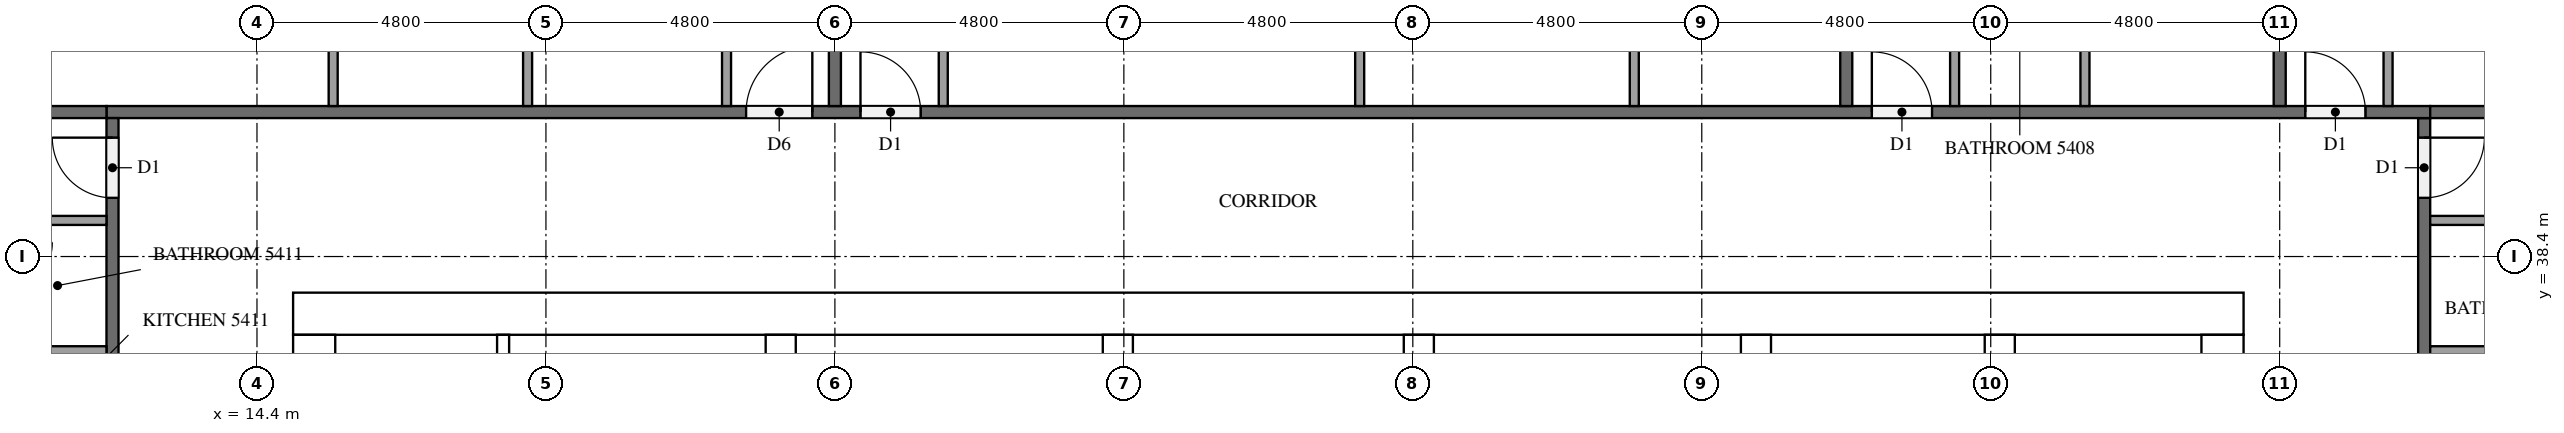
"""IFC4 building model, lengths in metres.
Left out: names, types, materials, properties, quantities, classifications, styles, units other than length and angle.
Written with IfcOpenShell. Run it as: python <this file> out.ifc"""

import sys

from ifc_helpers import new_model, si_unit, direction, frame, frame_2d, origin, place, context, subcontext, project, spatial, rectangle, extrude, element, fill, save


model = new_model("IFC4")
c1 = context("Model", 3, precision=1e-05, world=origin(), true_north=direction((0.0, 1.0)))
c2 = subcontext(c1, "Body", "Model", "MODEL_VIEW")
j1 = project(units=[si_unit("LENGTHUNIT", "METRE"), si_unit("PLANEANGLEUNIT", "RADIAN")], contexts=[c1])
p1 = place(None, origin())
s1 = spatial("IfcSite", under=j1, at=p1, CompositionType="ELEMENT")
p2 = place(p1, origin())
s2 = spatial("IfcBuilding", under=s1, at=p2, CompositionType="ELEMENT")
p3 = place(p2, frame((0.0, 0.0, 208.8)))
s3 = spatial("IfcBuildingStorey", under=s2, at=p3, CompositionType="ELEMENT", Elevation=208.8)
p4 = place(p3, frame((15.0, 37.45, 0.0), z_axis=(0.0, 0.0, 1.0), x_axis=(1.0, 0.0, 0.0)))
e1 = element("IfcWall", 1, at=p4, inside=s3, PredefinedType="SHEAR", context=c2, shape_type="SweptSolid", body=[
    extrude(rectangle(XDim=32.4, YDim=0.7, at=frame_2d((16.2, 0.0))), origin(), (0.0, 0.0, 1.0), 3.2),
])
p5 = place(p4, frame((15.3, 0.0, 0.0)))
e2 = element("IfcOpeningElement", 2, at=p5, cuts=e1, PredefinedType="OPENING", context=c2, shape_type="SweptSolid", body=[
    extrude(rectangle(XDim=1.8, YDim=2.1, at=frame_2d((0.9, 1.05))), frame((0.0, 0.36, 0.0), z_axis=(0.0, -1.0, 0.0), x_axis=(1.0, 0.0, 0.0)), (0.0, 0.0, 1.0), 0.72),
])
p6 = place(p4, frame((1.544, 0.0, 0.0)))
e3 = element("IfcOpeningElement", 3, at=p6, cuts=e1, PredefinedType="OPENING", context=c2, shape_type="SweptSolid", body=[
    extrude(rectangle(XDim=1.0, YDim=2.1, at=frame_2d((0.5, 1.05))), frame((0.0, 0.36, 0.0), z_axis=(0.0, -1.0, 0.0), x_axis=(1.0, 0.0, 0.0)), (0.0, 0.0, 1.0), 0.72),
])
p7 = place(p4, frame((5.219, 0.0, 0.0)))
e4 = element("IfcOpeningElement", 4, at=p7, cuts=e1, PredefinedType="OPENING", context=c2, shape_type="SweptSolid", body=[
    extrude(rectangle(XDim=1.0, YDim=2.1, at=frame_2d((0.5, 1.05))), frame((0.0, 0.36, 0.0), z_axis=(0.0, -1.0, 0.0), x_axis=(1.0, 0.0, 0.0)), (0.0, 0.0, 1.0), 0.72),
])
p8 = place(p3, frame((15.35, 15.7, 0.0), z_axis=(0.0, 0.0, 1.0), x_axis=(0.0, 1.0, 0.0)))
e5 = element("IfcWall", 5, at=p8, inside=s3, PredefinedType="SHEAR", context=c2, shape_type="SweptSolid", body=[
    extrude(rectangle(XDim=21.4, YDim=0.7, at=frame_2d((10.7, 0.0))), origin(), (0.0, 0.0, 1.0), 3.2),
])
p9 = place(p8, frame((5.06, 0.0, 0.0)))
e6 = element("IfcOpeningElement", 6, at=p9, cuts=e5, PredefinedType="OPENING", context=c2, shape_type="SweptSolid", body=[
    extrude(rectangle(XDim=1.2, YDim=2.1, at=frame_2d((0.6, 1.05))), frame((0.0, 0.36, 0.0), z_axis=(0.0, -1.0, 0.0), x_axis=(1.0, 0.0, 0.0)), (0.0, 0.0, 1.0), 0.72),
])
p10 = place(p3, frame((47.05, 15.7, 0.0), z_axis=(0.0, 0.0, 1.0), x_axis=(0.0, 1.0, 0.0)))
e7 = element("IfcWall", 7, at=p10, inside=s3, PredefinedType="SHEAR", context=c2, shape_type="SweptSolid", body=[
    extrude(rectangle(XDim=21.4, YDim=0.7, at=frame_2d((10.7, 0.0))), origin(), (0.0, 0.0, 1.0), 3.2),
])
p11 = place(p10, frame((10.4, 0.0, 0.0)))
e8 = element("IfcOpeningElement", 8, at=p11, cuts=e7, PredefinedType="OPENING", context=c2, shape_type="SweptSolid", body=[
    extrude(rectangle(XDim=1.2, YDim=2.1, at=frame_2d((0.6, 1.05))), frame((0.0, 0.36, 0.0), z_axis=(0.0, -1.0, 0.0), x_axis=(1.0, 0.0, 0.0)), (0.0, 0.0, 1.0), 0.72),
])
p12 = place(p3, frame((23.1, 15.7, 0.0), z_axis=(0.0, 0.0, 1.0), x_axis=(0.0, 1.0, 0.0)))
e9 = element("IfcWall", 9, at=p12, inside=s3, PredefinedType="SHEAR", context=c2, shape_type="SweptSolid", body=[
    extrude(rectangle(XDim=21.4, YDim=0.5, at=frame_2d((10.7, 0.0))), origin(), (0.0, 0.0, 1.0), 3.2),
])
p13 = place(p3, frame((39.3, 27.75, 0.0), z_axis=(0.0, 0.0, 1.0), x_axis=(0.0, 1.0, 0.0)))
e10 = element("IfcWall", 10, at=p13, inside=s3, PredefinedType="SHEAR", context=c2, shape_type="SweptSolid", body=[
    extrude(rectangle(XDim=9.35, YDim=0.5, at=frame_2d((4.675, 0.0))), origin(), (0.0, 0.0, 1.0), 3.2),
])
p14 = place(p3, frame((43.35, 27.75, 0.0), z_axis=(0.0, 0.0, 1.0), x_axis=(0.0, 1.0, 0.0)))
e11 = element("IfcWall", 11, at=p14, inside=s3, PredefinedType="SHEAR", context=c2, shape_type="SweptSolid", body=[
    extrude(rectangle(XDim=9.35, YDim=0.5, at=frame_2d((4.675, 0.0))), origin(), (0.0, 0.0, 1.0), 3.2),
])
p15 = place(p14, frame((7.65, 0.0, 0.0)))
e12 = element("IfcOpeningElement", 12, at=p15, cuts=e11, PredefinedType="OPENING", context=c2, shape_type="SweptSolid", body=[
    extrude(rectangle(XDim=1.2, YDim=2.1, at=frame_2d((0.6, 1.05))), frame((0.0, 0.26, 0.0), z_axis=(0.0, -1.0, 0.0), x_axis=(1.0, 0.0, 0.0)), (0.0, 0.0, 1.0), 0.52),
])
for number, where, z_axis, x_axis in (
    (13, (28.7, 33.8, 0.0), (0.0, 0.0, 1.0), (0.0, 1.0, 0.0)),
    (14, (33.7, 33.8, 0.0), (0.0, 0.0, 1.0), (0.0, 1.0, 0.0)),
):
    element("IfcWall", number, at=place(p3, frame(where, z_axis=z_axis, x_axis=x_axis)), inside=s3, PredefinedType="SHEAR", context=c2, shape_type="SweptSolid", body=[
        extrude(rectangle(XDim=3.3, YDim=0.5, at=frame_2d((1.65, 0.0))), origin(), (0.0, 0.0, 1.0), 3.2),
    ])
p16 = place(p3, frame((18.489, 31.5, 0.0), z_axis=(0.0, 0.0, 1.0), x_axis=(0.0, 1.0, 0.0)))
e15 = element("IfcWall", 15, at=p16, inside=s3, PredefinedType="PARTITIONING", context=c2, shape_type="SweptSolid", body=[
    extrude(rectangle(XDim=5.6, YDim=0.2, at=frame_2d((2.8, 0.0))), origin(), (0.0, 0.0, 1.0), 3.2),
])
p17 = place(p3, frame((50.4, 40.7, 0.0), z_axis=(0.0, 0.0, 1.0), x_axis=(0.0, -1.0, 0.0)))
e16 = element("IfcWall", 16, at=p17, inside=s3, PredefinedType="PARTITIONING", context=c2, shape_type="SweptSolid", body=[
    extrude(rectangle(XDim=28.6, YDim=0.2, at=frame_2d((14.3, 0.0))), origin(), (0.0, 0.0, 1.0), 3.2),
])
p18 = place(p17, frame((19.525, 0.0, 0.0)))
e17 = element("IfcOpeningElement", 17, at=p18, cuts=e16, PredefinedType="OPENING", context=c2, shape_type="SweptSolid", body=[
    extrude(rectangle(XDim=1.0, YDim=2.1, at=frame_2d((0.5, 1.05))), frame((0.0, 0.11, 0.0), z_axis=(0.0, -1.0, 0.0), x_axis=(1.0, 0.0, 0.0)), (0.0, 0.0, 1.0), 0.22),
])
p19 = place(p17, frame((7.525, 0.0, 0.0)))
e18 = element("IfcOpeningElement", 18, at=p19, cuts=e16, PredefinedType="OPENING", context=c2, shape_type="SweptSolid", body=[
    extrude(rectangle(XDim=1.0, YDim=2.1, at=frame_2d((0.5, 1.05))), frame((0.0, 0.11, 0.0), z_axis=(0.0, -1.0, 0.0), x_axis=(1.0, 0.0, 0.0)), (0.0, 0.0, 1.0), 0.22),
])
p20 = place(p17, frame((0.325, 0.0, 0.0)))
e19 = element("IfcOpeningElement", 19, at=p20, cuts=e16, PredefinedType="OPENING", context=c2, shape_type="SweptSolid", body=[
    extrude(rectangle(XDim=1.0, YDim=2.1, at=frame_2d((0.5, 1.05))), frame((0.0, 0.11, 0.0), z_axis=(0.0, -1.0, 0.0), x_axis=(1.0, 0.0, 0.0)), (0.0, 0.0, 1.0), 0.22),
])
p21 = place(p3, frame((11.9, 40.8, 0.0), z_axis=(0.0, 0.0, 1.0), x_axis=(1.0, 0.0, 0.0)))
e20 = element("IfcWall", 20, at=p21, inside=s3, PredefinedType="PARTITIONING", context=c2, shape_type="SweptSolid", body=[
    extrude(rectangle(XDim=38.6, YDim=0.2, at=frame_2d((19.3, 0.0))), origin(), (0.0, 0.0, 1.0), 3.2),
])
p22 = place(p21, frame((36.525, 0.0, 0.0)))
e21 = element("IfcOpeningElement", 21, at=p22, cuts=e20, PredefinedType="OPENING", context=c2, shape_type="SweptSolid", body=[
    extrude(rectangle(XDim=1.0, YDim=2.1, at=frame_2d((0.5, 1.05))), frame((0.0, 0.11, 0.0), z_axis=(0.0, -1.0, 0.0), x_axis=(1.0, 0.0, 0.0)), (0.0, 0.0, 1.0), 0.22),
])
p23 = place(p21, frame((29.325, 0.0, 0.0)))
e22 = element("IfcOpeningElement", 22, at=p23, cuts=e20, PredefinedType="OPENING", context=c2, shape_type="SweptSolid", body=[
    extrude(rectangle(XDim=1.0, YDim=2.1, at=frame_2d((0.5, 1.05))), frame((0.0, 0.11, 0.0), z_axis=(0.0, -1.0, 0.0), x_axis=(1.0, 0.0, 0.0)), (0.0, 0.0, 1.0), 0.22),
])
p24 = place(p21, frame((12.525, 0.0, 0.0)))
e23 = element("IfcOpeningElement", 23, at=p24, cuts=e20, PredefinedType="OPENING", context=c2, shape_type="SweptSolid", body=[
    extrude(rectangle(XDim=1.0, YDim=2.1, at=frame_2d((0.5, 1.05))), frame((0.0, 0.11, 0.0), z_axis=(0.0, -1.0, 0.0), x_axis=(1.0, 0.0, 0.0)), (0.0, 0.0, 1.0), 0.22),
])
p25 = place(p21, frame((10.625, 0.0, 0.0)))
e24 = element("IfcOpeningElement", 24, at=p25, cuts=e20, PredefinedType="OPENING", context=c2, shape_type="SweptSolid", body=[
    extrude(rectangle(XDim=1.1, YDim=2.1, at=frame_2d((0.55, 1.05))), frame((0.0, 0.11, 0.0), z_axis=(0.0, -1.0, 0.0), x_axis=(1.0, 0.0, 0.0)), (0.0, 0.0, 1.0), 0.22),
])
p26 = place(p3, frame((12.0, 12.1, 0.0), z_axis=(0.0, 0.0, 1.0), x_axis=(0.0, 1.0, 0.0)))
e25 = element("IfcWall", 25, at=p26, inside=s3, PredefinedType="PARTITIONING", context=c2, shape_type="SweptSolid", body=[
    extrude(rectangle(XDim=28.6, YDim=0.2, at=frame_2d((14.3, 0.0))), origin(), (0.0, 0.0, 1.0), 3.2),
])
p27 = place(p26, frame((27.275, 0.0, 0.0)))
e26 = element("IfcOpeningElement", 26, at=p27, cuts=e25, PredefinedType="OPENING", context=c2, shape_type="SweptSolid", body=[
    extrude(rectangle(XDim=1.0, YDim=2.1, at=frame_2d((0.5, 1.05))), frame((0.0, 0.11, 0.0), z_axis=(0.0, -1.0, 0.0), x_axis=(1.0, 0.0, 0.0)), (0.0, 0.0, 1.0), 0.22),
])
p28 = place(p26, frame((12.325, 0.0, 0.0)))
e27 = element("IfcOpeningElement", 27, at=p28, cuts=e25, PredefinedType="OPENING", context=c2, shape_type="SweptSolid", body=[
    extrude(rectangle(XDim=1.0, YDim=2.1, at=frame_2d((0.5, 1.05))), frame((0.0, 0.11, 0.0), z_axis=(0.0, -1.0, 0.0), x_axis=(1.0, 0.0, 0.0)), (0.0, 0.0, 1.0), 0.22),
])
p29 = place(p26, frame((2.725, 0.0, 0.0)))
e28 = element("IfcOpeningElement", 28, at=p29, cuts=e25, PredefinedType="OPENING", context=c2, shape_type="SweptSolid", body=[
    extrude(rectangle(XDim=1.0, YDim=2.1, at=frame_2d((0.5, 1.05))), frame((0.0, 0.11, 0.0), z_axis=(0.0, -1.0, 0.0), x_axis=(1.0, 0.0, 0.0)), (0.0, 0.0, 1.0), 0.22),
])
p30 = place(p26, frame((0.875, 0.0, 0.0)))
e29 = element("IfcOpeningElement", 29, at=p30, cuts=e25, PredefinedType="OPENING", context=c2, shape_type="SweptSolid", body=[
    extrude(rectangle(XDim=1.0, YDim=2.1, at=frame_2d((0.5, 1.05))), frame((0.0, 0.11, 0.0), z_axis=(0.0, -1.0, 0.0), x_axis=(1.0, 0.0, 0.0)), (0.0, 0.0, 1.0), 0.22),
])
p31 = place(p3, frame((50.5, 40.8, 0.0), z_axis=(0.0, 0.0, 1.0), x_axis=(1.0, 0.0, 0.0)))
e30 = element("IfcWall", 30, at=p31, inside=s3, PredefinedType="PARTITIONING", context=c2, shape_type="SweptSolid", body=[
    extrude(rectangle(XDim=11.8, YDim=0.2, at=frame_2d((5.9, 0.0))), origin(), (0.0, 0.0, 1.0), 3.2),
])
p32 = place(p3, frame((48.0, 52.475, 0.0), z_axis=(0.0, 0.0, 1.0), x_axis=(0.0, -1.0, 0.0)))
e31 = element("IfcWall", 31, at=p32, inside=s3, PredefinedType="PARTITIONING", context=c2, shape_type="SweptSolid", body=[
    extrude(rectangle(XDim=11.575, YDim=0.2, at=frame_2d((5.788, 0.0))), origin(), (0.0, 0.0, 1.0), 3.2),
])
for number, where, z_axis, x_axis in (
    (32, (40.8, 52.7, 0.0), (0.0, 0.0, 1.0), (0.0, -1.0, 0.0)),
    (33, (24.0, 52.7, 0.0), (0.0, 0.0, 1.0), (0.0, -1.0, 0.0)),
):
    element("IfcWall", number, at=place(p3, frame(where, z_axis=z_axis, x_axis=x_axis)), inside=s3, PredefinedType="PARTITIONING", context=c2, shape_type="SweptSolid", body=[
        extrude(rectangle(XDim=11.8, YDim=0.2, at=frame_2d((5.9, 0.0))), origin(), (0.0, 0.0, 1.0), 3.2),
    ])
p33 = place(p3, frame((4.9, 40.8, 0.0), z_axis=(0.0, 0.0, 1.0), x_axis=(1.0, 0.0, 0.0)))
e34 = element("IfcWall", 34, at=p33, inside=s3, PredefinedType="PARTITIONING", context=c2, shape_type="SweptSolid", body=[
    extrude(rectangle(XDim=7.0, YDim=0.2, at=frame_2d((3.5, 0.0))), origin(), (0.0, 0.0, 1.0), 3.2),
])
p34 = place(p3, frame((50.5, 36.835, 0.0), z_axis=(0.0, 0.0, 1.0), x_axis=(1.0, 0.0, 0.0)))
e35 = element("IfcWall", 35, at=p34, inside=s3, PredefinedType="PARTITIONING", context=c2, shape_type="SweptSolid", body=[
    extrude(rectangle(XDim=2.975, YDim=0.15, at=frame_2d((1.488, 0.0))), origin(), (0.0, 0.0, 1.0), 3.2),
])
p35 = place(p3, frame((50.5, 39.0, 0.0), z_axis=(0.0, 0.0, 1.0), x_axis=(1.0, 0.0, 0.0)))
e36 = element("IfcWall", 36, at=p35, inside=s3, PredefinedType="PARTITIONING", context=c2, shape_type="SweptSolid", body=[
    extrude(rectangle(XDim=3.125, YDim=0.15, at=frame_2d((1.562, 0.0))), origin(), (0.0, 0.0, 1.0), 3.2),
])
p36 = place(p3, frame((49.8, 40.9, 0.0), z_axis=(0.0, 0.0, 1.0), x_axis=(0.0, 1.0, 0.0)))
e37 = element("IfcWall", 37, at=p36, inside=s3, PredefinedType="PARTITIONING", context=c2, shape_type="SweptSolid", body=[
    extrude(rectangle(XDim=3.425, YDim=0.15, at=frame_2d((1.712, 0.0))), origin(), (0.0, 0.0, 1.0), 3.2),
])
p37 = place(p3, frame((44.765, 40.9, 0.0), z_axis=(0.0, 0.0, 1.0), x_axis=(0.0, 1.0, 0.0)))
e38 = element("IfcWall", 38, at=p37, inside=s3, PredefinedType="PARTITIONING", context=c2, shape_type="SweptSolid", body=[
    extrude(rectangle(XDim=4.325, YDim=0.15, at=frame_2d((2.163, 0.0))), origin(), (0.0, 0.0, 1.0), 3.2),
])
p38 = place(p3, frame((42.6, 40.9, 0.0), z_axis=(0.0, 0.0, 1.0), x_axis=(0.0, 1.0, 0.0)))
e39 = element("IfcWall", 39, at=p38, inside=s3, PredefinedType="PARTITIONING", context=c2, shape_type="SweptSolid", body=[
    extrude(rectangle(XDim=4.475, YDim=0.15, at=frame_2d((2.238, 0.0))), origin(), (0.0, 0.0, 1.0), 3.2),
])
for number, where, z_axis, x_axis in (
    (40, (32.717, 40.9, 0.0), (0.0, 0.0, 1.0), (0.0, 1.0, 0.0)),
    (41, (37.279, 40.9, 0.0), (0.0, 0.0, 1.0), (0.0, 1.0, 0.0)),
):
    element("IfcWall", number, at=place(p3, frame(where, z_axis=z_axis, x_axis=x_axis)), inside=s3, PredefinedType="PARTITIONING", context=c2, shape_type="SweptSolid", body=[
        extrude(rectangle(XDim=4.175, YDim=0.15, at=frame_2d((2.087, 0.0))), origin(), (0.0, 0.0, 1.0), 3.2),
    ])
p39 = place(p3, frame((25.8, 40.9, 0.0), z_axis=(0.0, 0.0, 1.0), x_axis=(0.0, 1.0, 0.0)))
e42 = element("IfcWall", 42, at=p39, inside=s3, PredefinedType="PARTITIONING", context=c2, shape_type="SweptSolid", body=[
    extrude(rectangle(XDim=4.325, YDim=0.15, at=frame_2d((2.163, 0.0))), origin(), (0.0, 0.0, 1.0), 3.2),
])
for number, where, z_axis, x_axis in (
    (43, (18.895, 40.9, 0.0), (0.0, 0.0, 1.0), (0.0, 1.0, 0.0)),
    (44, (15.666, 40.9, 0.0), (0.0, 0.0, 1.0), (0.0, 1.0, 0.0)),
):
    element("IfcWall", number, at=place(p3, frame(where, z_axis=z_axis, x_axis=x_axis)), inside=s3, PredefinedType="PARTITIONING", context=c2, shape_type="SweptSolid", body=[
        extrude(rectangle(XDim=3.125, YDim=0.15, at=frame_2d((1.562, 0.0))), origin(), (0.0, 0.0, 1.0), 3.2),
    ])
p40 = place(p3, frame((22.2, 40.9, 0.0), z_axis=(0.0, 0.0, 1.0), x_axis=(0.0, 1.0, 0.0)))
e45 = element("IfcWall", 45, at=p40, inside=s3, PredefinedType="PARTITIONING", context=c2, shape_type="SweptSolid", body=[
    extrude(rectangle(XDim=3.275, YDim=0.15, at=frame_2d((1.638, 0.0))), origin(), (0.0, 0.0, 1.0), 3.2),
])
p41 = place(p3, frame((11.9, 36.835, 0.0), z_axis=(0.0, 0.0, 1.0), x_axis=(-1.0, 0.0, 0.0)))
e46 = element("IfcWall", 46, at=p41, inside=s3, PredefinedType="PARTITIONING", context=c2, shape_type="SweptSolid", body=[
    extrude(rectangle(XDim=1.625, YDim=0.15, at=frame_2d((0.812, 0.0))), origin(), (0.0, 0.0, 1.0), 3.2),
])
p42 = place(p3, frame((11.9, 39.0, 0.0), z_axis=(0.0, 0.0, 1.0), x_axis=(-1.0, 0.0, 0.0)))
e47 = element("IfcWall", 47, at=p42, inside=s3, PredefinedType="PARTITIONING", context=c2, shape_type="SweptSolid", body=[
    extrude(rectangle(XDim=1.775, YDim=0.15, at=frame_2d((0.887, 0.0))), origin(), (0.0, 0.0, 1.0), 3.2),
])
p43 = place(p5, origin())
e48 = element("IfcDoor", 48, at=p43, inside=s3, OperationType="DOUBLE_DOOR_SINGLE_SWING", PredefinedType="DOOR", context=c2, shape_type="SweptSolid", body=[
    extrude(rectangle(XDim=1.8, YDim=2.1, at=frame_2d((0.9, 1.05))), frame((0.0, 0.025, 0.0), z_axis=(0.0, -1.0, 0.0), x_axis=(1.0, 0.0, 0.0)), (0.0, 0.0, 1.0), 0.05),
])
fill(e2, e48)
p44 = place(p6, origin())
e49 = element("IfcDoor", 49, at=p44, inside=s3, OperationType="SINGLE_SWING_LEFT", PredefinedType="DOOR", context=c2, shape_type="SweptSolid", body=[
    extrude(rectangle(XDim=1.0, YDim=2.1, at=frame_2d((0.5, 1.05))), frame((0.0, 0.025, 0.0), z_axis=(0.0, -1.0, 0.0), x_axis=(1.0, 0.0, 0.0)), (0.0, 0.0, 1.0), 0.05),
])
fill(e3, e49)
p45 = place(p7, origin())
e50 = element("IfcDoor", 50, at=p45, inside=s3, OperationType="SINGLE_SWING_RIGHT", PredefinedType="DOOR", context=c2, shape_type="SweptSolid", body=[
    extrude(rectangle(XDim=1.0, YDim=2.1, at=frame_2d((0.5, 1.05))), frame((0.0, 0.025, 0.0), z_axis=(0.0, -1.0, 0.0), x_axis=(1.0, 0.0, 0.0)), (0.0, 0.0, 1.0), 0.05),
])
fill(e4, e50)
p46 = place(p20, origin())
e51 = element("IfcDoor", 51, at=p46, inside=s3, OperationType="SINGLE_SWING_LEFT", PredefinedType="DOOR", context=c2, shape_type="SweptSolid", body=[
    extrude(rectangle(XDim=1.0, YDim=2.1, at=frame_2d((0.5, 1.05))), frame((0.0, 0.025, 0.0), z_axis=(0.0, -1.0, 0.0), x_axis=(1.0, 0.0, 0.0)), (0.0, 0.0, 1.0), 0.05),
])
fill(e19, e51)
p47 = place(p22, origin())
e52 = element("IfcDoor", 52, at=p47, inside=s3, OperationType="SINGLE_SWING_LEFT", PredefinedType="DOOR", context=c2, shape_type="SweptSolid", body=[
    extrude(rectangle(XDim=1.0, YDim=2.1, at=frame_2d((0.5, 1.05))), frame((0.0, 0.025, 0.0), z_axis=(0.0, -1.0, 0.0), x_axis=(1.0, 0.0, 0.0)), (0.0, 0.0, 1.0), 0.05),
])
fill(e21, e52)
p48 = place(p23, origin())
e53 = element("IfcDoor", 53, at=p48, inside=s3, OperationType="SINGLE_SWING_LEFT", PredefinedType="DOOR", context=c2, shape_type="SweptSolid", body=[
    extrude(rectangle(XDim=1.0, YDim=2.1, at=frame_2d((0.5, 1.05))), frame((0.0, 0.025, 0.0), z_axis=(0.0, -1.0, 0.0), x_axis=(1.0, 0.0, 0.0)), (0.0, 0.0, 1.0), 0.05),
])
fill(e22, e53)
p49 = place(p24, origin())
e54 = element("IfcDoor", 54, at=p49, inside=s3, OperationType="SINGLE_SWING_LEFT", PredefinedType="DOOR", context=c2, shape_type="SweptSolid", body=[
    extrude(rectangle(XDim=1.0, YDim=2.1, at=frame_2d((0.5, 1.05))), frame((0.0, 0.025, 0.0), z_axis=(0.0, -1.0, 0.0), x_axis=(1.0, 0.0, 0.0)), (0.0, 0.0, 1.0), 0.05),
])
fill(e23, e54)
p50 = place(p25, origin())
e55 = element("IfcDoor", 55, at=p50, inside=s3, OperationType="SINGLE_SWING_RIGHT", PredefinedType="DOOR", context=c2, shape_type="SweptSolid", body=[
    extrude(rectangle(XDim=1.1, YDim=2.1, at=frame_2d((0.55, 1.05))), frame((0.0, 0.025, 0.0), z_axis=(0.0, -1.0, 0.0), x_axis=(1.0, 0.0, 0.0)), (0.0, 0.0, 1.0), 0.05),
])
fill(e24, e55)
p51 = place(p27, origin())
e56 = element("IfcDoor", 56, at=p51, inside=s3, OperationType="SINGLE_SWING_RIGHT", PredefinedType="DOOR", context=c2, shape_type="SweptSolid", body=[
    extrude(rectangle(XDim=1.0, YDim=2.1, at=frame_2d((0.5, 1.05))), frame((0.0, 0.025, 0.0), z_axis=(0.0, -1.0, 0.0), x_axis=(1.0, 0.0, 0.0)), (0.0, 0.0, 1.0), 0.05),
])
fill(e26, e56)
save(model, sys.argv[1])
